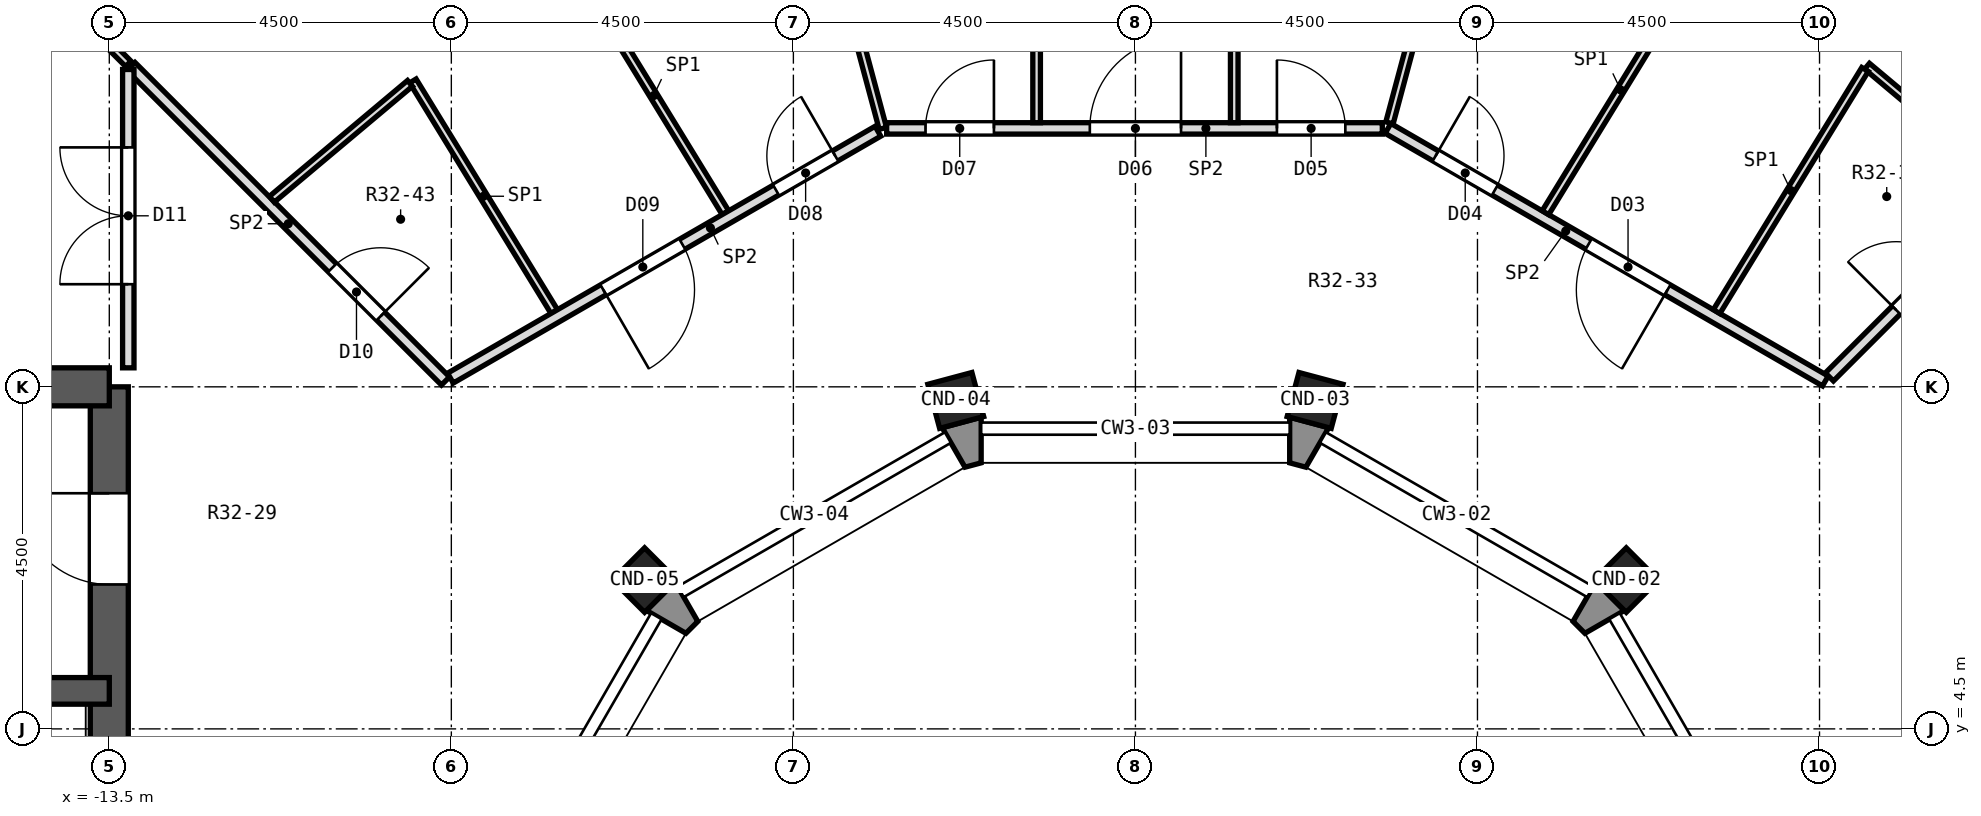
"""IFC4 building model, lengths in metres.
Left out: names, types, materials, properties, quantities, classifications, styles, units other than length and angle.
Written with IfcOpenShell. Run it as: python <this file> out.ifc"""

import sys

from ifc_helpers import new_model, si_unit, direction, frame, frame_2d, origin, origin_2d, place, context, subcontext, project, spatial, polyline, rectangle, outline, extrude, element, fill, save


model = new_model("IFC4")
c1 = context("Model", 3, precision=1e-05, world=origin(), true_north=direction((0.0, 1.0)))
c2 = subcontext(c1, "Body", "Model", "MODEL_VIEW")
j1 = project(units=[si_unit("LENGTHUNIT", "METRE"), si_unit("PLANEANGLEUNIT", "RADIAN")], contexts=[c1])
p1 = place(None, origin())
s1 = spatial("IfcSite", under=j1, at=p1, CompositionType="ELEMENT")
p2 = place(p1, origin())
s2 = spatial("IfcBuilding", under=s1, at=p2, CompositionType="ELEMENT")
p3 = place(p2, frame((0.0, 0.0, 224.7)))
s3 = spatial("IfcBuildingStorey", under=s2, at=p3, CompositionType="ELEMENT", Elevation=224.7)
for number, where, z_axis, x_axis in (
    (1, (6.458, 6.458, 0.0), (0.0, 0.0, 1.0), (0.707, 0.707, 0.0)),
    (2, (2.364, 8.821, 0.0), (0.0, 0.0, 1.0), (0.259, 0.966, 0.0)),
    (3, (-2.364, 8.821, 0.0), (0.0, 0.0, 1.0), (-0.259, 0.966, 0.0)),
    (4, (-6.458, 6.458, 0.0), (0.0, 0.0, 1.0), (-0.707, 0.707, 0.0)),
):
    element("IfcColumn", number, at=place(p3, frame(where, z_axis=z_axis, x_axis=x_axis)), inside=s3, PredefinedType="COLUMN", context=c2, shape_type="SweptSolid", body=[
        extrude(rectangle(XDim=0.6, YDim=0.6, at=origin_2d()), origin(), (0.0, 0.0, 1.0), 5.0),
    ])
p4 = place(p3, frame((-13.5, -9.0, 0.0), z_axis=(0.0, 0.0, 1.0), x_axis=(0.0, 1.0, 0.0)))
e5 = element("IfcWall", 5, at=p4, inside=s3, PredefinedType="SHEAR", context=c2, shape_type="SweptSolid", body=[
    extrude(rectangle(XDim=18.0, YDim=0.5, at=frame_2d((9.0, 0.0))), origin(), (0.0, 0.0, 1.0), 5.0),
])
p5 = place(p4, frame((15.4, 0.0, 0.0)))
e6 = element("IfcOpeningElement", 6, at=p5, cuts=e5, PredefinedType="OPENING", context=c2, shape_type="SweptSolid", body=[
    extrude(rectangle(XDim=1.2, YDim=2.1, at=frame_2d((0.6, 1.05))), frame((0.0, 0.262, 0.0), z_axis=(0.0, -1.0, 0.0), x_axis=(1.0, 0.0, 0.0)), (0.0, 0.0, 1.0), 0.524),
])
p6 = place(p4, frame((1.4, 0.0, 0.0)))
e7 = element("IfcOpeningElement", 7, at=p6, cuts=e5, PredefinedType="OPENING", context=c2, shape_type="SweptSolid", body=[
    extrude(rectangle(XDim=1.2, YDim=2.1, at=frame_2d((0.6, 1.05))), frame((0.0, 0.262, 0.0), z_axis=(0.0, -1.0, 0.0), x_axis=(1.0, 0.0, 0.0)), (0.0, 0.0, 1.0), 0.524),
])
p7 = place(p4, frame((7.5, 0.0, 0.0)))
e8 = element("IfcOpeningElement", 8, at=p7, cuts=e5, PredefinedType="OPENING", context=c2, shape_type="SweptSolid", body=[
    extrude(rectangle(XDim=3.0, YDim=2.4, at=frame_2d((1.5, 1.2))), frame((0.0, 0.262, 0.0), z_axis=(0.0, -1.0, 0.0), x_axis=(1.0, 0.0, 0.0)), (0.0, 0.0, 1.0), 0.524),
])
p8 = place(p3, frame((-13.5, 9.0, 0.0), z_axis=(0.0, 0.0, 1.0), x_axis=(-1.0, 0.0, 0.0)))
e9 = element("IfcWall", 9, at=p8, inside=s3, PredefinedType="SHEAR", context=c2, shape_type="SweptSolid", body=[
    extrude(rectangle(XDim=6.0, YDim=0.5, at=frame_2d((3.0, 0.0))), origin(), (0.0, 0.0, 1.0), 5.0),
])
p9 = place(p3, frame((-13.5, 5.0, 0.0), z_axis=(0.0, 0.0, 1.0), x_axis=(-1.0, 0.0, 0.0)))
e10 = element("IfcWall", 10, at=p9, inside=s3, PredefinedType="SHEAR", context=c2, shape_type="SweptSolid", body=[
    extrude(rectangle(XDim=6.0, YDim=0.35, at=frame_2d((3.0, 0.0))), origin(), (0.0, 0.0, 1.0), 5.0),
])
p10 = place(p3, origin())
e11 = element("IfcWall", 11, at=p10, inside=s3, PredefinedType="SOLIDWALL", context=c2, shape_type="SweptSolid", body=[
    extrude(outline(polyline([(6.058, 6.433), (5.758, 5.914), (5.914, 5.758), (6.433, 6.058), (6.058, 6.433)])), origin(), (0.0, 0.0, 1.0), 4.6),
])
p11 = place(p3, origin())
e12 = element("IfcWall", 12, at=p11, inside=s3, PredefinedType="SOLIDWALL", context=c2, shape_type="SweptSolid", body=[
    extrude(outline(polyline([(2.029, 8.6), (2.029, 8.0), (2.242, 7.943), (2.542, 8.462), (2.029, 8.6)])), origin(), (0.0, 0.0, 1.0), 4.6),
])
p12 = place(p3, origin())
e13 = element("IfcWall", 13, at=p12, inside=s3, PredefinedType="SOLIDWALL", context=c2, shape_type="SweptSolid", body=[
    extrude(outline(polyline([(-2.542, 8.462), (-2.242, 7.943), (-2.029, 8.0), (-2.029, 8.6), (-2.542, 8.462)])), origin(), (0.0, 0.0, 1.0), 4.6),
])
p13 = place(p3, origin())
e14 = element("IfcWall", 14, at=p13, inside=s3, PredefinedType="SOLIDWALL", context=c2, shape_type="SweptSolid", body=[
    extrude(outline(polyline([(-6.433, 6.058), (-5.914, 5.758), (-5.758, 5.914), (-6.058, 6.433), (-6.433, 6.058)])), origin(), (0.0, 0.0, 1.0), 4.6),
])
p14 = place(p3, frame((-5.646, 21.072, 0.0), z_axis=(0.0, 0.0, 1.0), x_axis=(0.258728835498, -0.965949993365, 0.0)))
e15 = element("IfcWall", 15, at=p14, inside=s3, PredefinedType="PARTITIONING", context=c2, shape_type="SweptSolid", body=[
    extrude(rectangle(XDim=8.978, YDim=0.1, at=frame_2d((4.489, 0.0))), origin(), (0.0, 0.0, 1.0), 4.6),
])
p15 = place(p3, frame((-9.506, 13.024, 0.0), z_axis=(0.0, 0.0, 1.0), x_axis=(0.522634449586, -0.852556879103, 0.0)))
e16 = element("IfcWall", 16, at=p15, inside=s3, PredefinedType="PARTITIONING", context=c2, shape_type="SweptSolid", body=[
    extrude(rectangle(XDim=3.559, YDim=0.1, at=frame_2d((1.779, 0.0))), origin(), (0.0, 0.0, 1.0), 4.6),
])
p16 = place(p3, frame((-7.282, 14.372, 0.0), z_axis=(0.0, 0.0, 1.0), x_axis=(0.522422625175, -0.852686695513, 0.0)))
e17 = element("IfcWall", 17, at=p16, inside=s3, PredefinedType="PARTITIONING", context=c2, shape_type="SweptSolid", body=[
    extrude(rectangle(XDim=3.613, YDim=0.1, at=frame_2d((1.807, 0.0))), origin(), (0.0, 0.0, 1.0), 4.6),
])
p17 = place(p3, frame((-15.426, 15.426, 0.0), z_axis=(0.0, 0.0, 1.0), x_axis=(0.707106781187, -0.707106781187, 0.0)))
e18 = element("IfcWall", 18, at=p17, inside=s3, PredefinedType="PARTITIONING", context=c2, shape_type="SweptSolid", body=[
    extrude(rectangle(XDim=3.077, YDim=0.1, at=frame_2d((1.538, 0.0))), origin(), (0.0, 0.0, 1.0), 4.6),
])
p18 = place(p3, frame((-13.215, 13.215, 0.0), z_axis=(0.0, 0.0, 1.0), x_axis=(0.707106781187, -0.707106781187, 0.0)))
e19 = element("IfcWall", 19, at=p18, inside=s3, PredefinedType="PARTITIONING", context=c2, shape_type="SweptSolid", body=[
    extrude(rectangle(XDim=5.852, YDim=0.15, at=frame_2d((2.926, 0.0))), origin(), (0.0, 0.0, 1.0), 4.6),
])
p19 = place(p18, frame((3.746, 0.0, 0.0)))
e20 = element("IfcOpeningElement", 20, at=p19, cuts=e19, PredefinedType="OPENING", context=c2, shape_type="SweptSolid", body=[
    extrude(rectangle(XDim=0.9, YDim=2.1, at=frame_2d((0.45, 1.05))), frame((0.0, 0.087, 0.0), z_axis=(0.0, -1.0, 0.0), x_axis=(1.0, 0.0, 0.0)), (0.0, 0.0, 1.0), 0.174),
])
p20 = place(p3, frame((9.625, 13.218, 0.0), z_axis=(0.0, 0.0, 1.0), x_axis=(0.766147679589, -0.642664557184, 0.0)))
e21 = element("IfcWall", 21, at=p20, inside=s3, PredefinedType="PARTITIONING", context=c2, shape_type="SweptSolid", body=[
    extrude(rectangle(XDim=2.475, YDim=0.1, at=frame_2d((1.238, 0.0))), origin(), (0.0, 0.0, 1.0), 4.6),
])
p21 = place(p3, frame((3.323, 12.4, 0.0), z_axis=(0.0, 0.0, 1.0), x_axis=(0.865961614908, -0.500110469302, 0.0)))
e22 = element("IfcWall", 22, at=p21, inside=s3, PredefinedType="PARTITIONING", context=c2, shape_type="SweptSolid", body=[
    extrude(rectangle(XDim=6.645, YDim=0.15, at=frame_2d((3.322, 0.0))), origin(), (0.0, 0.0, 1.0), 4.6),
])
p22 = place(p21, frame((3.047, 0.0, 0.0)))
e23 = element("IfcOpeningElement", 23, at=p22, cuts=e22, PredefinedType="OPENING", context=c2, shape_type="SweptSolid", body=[
    extrude(rectangle(XDim=1.2, YDim=2.1, at=frame_2d((0.6, 1.05))), frame((0.0, 0.087, 0.0), z_axis=(0.0, -1.0, 0.0), x_axis=(1.0, 0.0, 0.0)), (0.0, 0.0, 1.0), 0.174),
])
p23 = place(p21, frame((0.723, 0.0, 0.0)))
e24 = element("IfcOpeningElement", 24, at=p23, cuts=e22, PredefinedType="OPENING", context=c2, shape_type="SweptSolid", body=[
    extrude(rectangle(XDim=0.9, YDim=2.1, at=frame_2d((0.45, 1.05))), frame((0.0, 0.087, 0.0), z_axis=(0.0, -1.0, 0.0), x_axis=(1.0, 0.0, 0.0)), (0.0, 0.0, 1.0), 0.174),
])
p24 = place(p3, frame((-3.273, 12.4, 0.0), z_axis=(0.0, 0.0, 1.0), x_axis=(1.0, 0.0, 0.0)))
e25 = element("IfcWall", 25, at=p24, inside=s3, PredefinedType="PARTITIONING", context=c2, shape_type="SweptSolid", body=[
    extrude(rectangle(XDim=6.521, YDim=0.15, at=frame_2d((3.26, 0.0))), origin(), (0.0, 0.0, 1.0), 4.6),
])
p25 = place(p24, frame((5.135, 0.0, 0.0)))
e26 = element("IfcOpeningElement", 26, at=p25, cuts=e25, PredefinedType="OPENING", context=c2, shape_type="SweptSolid", body=[
    extrude(rectangle(XDim=0.9, YDim=2.1, at=frame_2d((0.45, 1.05))), frame((0.0, 0.087, 0.0), z_axis=(0.0, -1.0, 0.0), x_axis=(1.0, 0.0, 0.0)), (0.0, 0.0, 1.0), 0.174),
])
p26 = place(p24, frame((2.673, 0.0, 0.0)))
e27 = element("IfcOpeningElement", 27, at=p26, cuts=e25, PredefinedType="OPENING", context=c2, shape_type="SweptSolid", body=[
    extrude(rectangle(XDim=1.2, YDim=2.1, at=frame_2d((0.6, 1.05))), frame((0.0, 0.087, 0.0), z_axis=(0.0, -1.0, 0.0), x_axis=(1.0, 0.0, 0.0)), (0.0, 0.0, 1.0), 0.174),
])
p27 = place(p24, frame((0.511, 0.0, 0.0)))
e28 = element("IfcOpeningElement", 28, at=p27, cuts=e25, PredefinedType="OPENING", context=c2, shape_type="SweptSolid", body=[
    extrude(rectangle(XDim=0.9, YDim=2.1, at=frame_2d((0.45, 1.05))), frame((0.0, 0.087, 0.0), z_axis=(0.0, -1.0, 0.0), x_axis=(1.0, 0.0, 0.0)), (0.0, 0.0, 1.0), 0.174),
])
p28 = place(p3, frame((-9.012, 9.115, 0.0), z_axis=(0.0, 0.0, 1.0), x_axis=(0.865967095912, 0.5001009786, 0.0)))
e29 = element("IfcWall", 29, at=p28, inside=s3, PredefinedType="PARTITIONING", context=c2, shape_type="SweptSolid", body=[
    extrude(rectangle(XDim=6.495, YDim=0.15, at=frame_2d((3.248, 0.0))), origin(), (0.0, 0.0, 1.0), 4.6),
])
p29 = place(p28, frame((4.947, 0.0, 0.0)))
e30 = element("IfcOpeningElement", 30, at=p29, cuts=e29, PredefinedType="OPENING", context=c2, shape_type="SweptSolid", body=[
    extrude(rectangle(XDim=0.9, YDim=2.1, at=frame_2d((0.45, 1.05))), frame((0.0, 0.087, 0.0), z_axis=(0.0, -1.0, 0.0), x_axis=(1.0, 0.0, 0.0)), (0.0, 0.0, 1.0), 0.174),
])
p30 = place(p28, frame((2.323, 0.0, 0.0)))
e31 = element("IfcOpeningElement", 31, at=p30, cuts=e29, PredefinedType="OPENING", context=c2, shape_type="SweptSolid", body=[
    extrude(rectangle(XDim=1.2, YDim=2.1, at=frame_2d((0.6, 1.05))), frame((0.0, 0.087, 0.0), z_axis=(0.0, -1.0, 0.0), x_axis=(1.0, 0.0, 0.0)), (0.0, 0.0, 1.0), 0.174),
])
p31 = place(p3, frame((-11.362, 11.467, 0.0), z_axis=(0.0, 0.0, 1.0), x_axis=(0.766108172673, 0.642711652115, 0.0)))
e32 = element("IfcWall", 32, at=p31, inside=s3, PredefinedType="PARTITIONING", context=c2, shape_type="SweptSolid", body=[
    extrude(rectangle(XDim=2.372, YDim=0.1, at=frame_2d((1.186, 0.0))), origin(), (0.0, 0.0, 1.0), 4.6),
])
p32 = place(p3, frame((9.13, 9.13, 0.0), z_axis=(0.0, 0.0, 1.0), x_axis=(0.707106781187, 0.707106781187, 0.0)))
e33 = element("IfcWall", 33, at=p32, inside=s3, PredefinedType="PARTITIONING", context=c2, shape_type="SweptSolid", body=[
    extrude(rectangle(XDim=5.777, YDim=0.15, at=frame_2d((2.888, 0.0))), origin(), (0.0, 0.0, 1.0), 4.6),
])
p33 = place(p32, frame((1.244, 0.0, 0.0)))
e34 = element("IfcOpeningElement", 34, at=p33, cuts=e33, PredefinedType="OPENING", context=c2, shape_type="SweptSolid", body=[
    extrude(rectangle(XDim=0.9, YDim=2.1, at=frame_2d((0.45, 1.05))), frame((0.0, 0.087, 0.0), z_axis=(0.0, -1.0, 0.0), x_axis=(1.0, 0.0, 0.0)), (0.0, 0.0, 1.0), 0.174),
])
p34 = place(p3, frame((7.646, 9.99, 0.0), z_axis=(0.0, 0.0, 1.0), x_axis=(0.522631009754, 0.852558987779, 0.0)))
e35 = element("IfcWall", 35, at=p34, inside=s3, PredefinedType="PARTITIONING", context=c2, shape_type="SweptSolid", body=[
    extrude(rectangle(XDim=3.736, YDim=0.1, at=frame_2d((1.868, 0.0))), origin(), (0.0, 0.0, 1.0), 4.6),
])
p35 = place(p3, frame((5.394, 11.291, 0.0), z_axis=(0.0, 0.0, 1.0), x_axis=(0.522471391937, 0.852656815259, 0.0)))
e36 = element("IfcWall", 36, at=p35, inside=s3, PredefinedType="PARTITIONING", context=c2, shape_type="SweptSolid", body=[
    extrude(rectangle(XDim=3.789, YDim=0.1, at=frame_2d((1.895, 0.0))), origin(), (0.0, 0.0, 1.0), 4.6),
])
p36 = place(p3, frame((3.342, 12.472, 0.0), z_axis=(0.0, 0.0, 1.0), x_axis=(0.258684909749, 0.965961757767, 0.0)))
e37 = element("IfcWall", 37, at=p36, inside=s3, PredefinedType="PARTITIONING", context=c2, shape_type="SweptSolid", body=[
    extrude(rectangle(XDim=8.903, YDim=0.1, at=frame_2d((4.451, 0.0))), origin(), (0.0, 0.0, 1.0), 4.6),
])
for number, where, z_axis, x_axis in (
    (38, (1.3, 12.475, 0.0), (0.0, 0.0, 1.0), (0.0, 1.0, 0.0)),
    (39, (-1.3, 12.475, 0.0), (0.0, 0.0, 1.0), (0.0, 1.0, 0.0)),
):
    element("IfcWall", number, at=place(p3, frame(where, z_axis=z_axis, x_axis=x_axis)), inside=s3, PredefinedType="PARTITIONING", context=c2, shape_type="SweptSolid", body=[
        extrude(rectangle(XDim=4.287, YDim=0.1, at=frame_2d((2.144, 0.0))), origin(), (0.0, 0.0, 1.0), 4.6),
    ])
p37 = place(p3, frame((-13.25, 9.25, 0.0), z_axis=(0.0, 0.0, 1.0), x_axis=(0.0, 1.0, 0.0)))
e40 = element("IfcWall", 40, at=p37, inside=s3, PredefinedType="PARTITIONING", context=c2, shape_type="SweptSolid", body=[
    extrude(rectangle(XDim=3.925, YDim=0.15, at=frame_2d((1.962, 0.0))), origin(), (0.0, 0.0, 1.0), 4.6),
])
p38 = place(p37, frame((1.1, 0.0, 0.0)))
e41 = element("IfcOpeningElement", 41, at=p38, cuts=e40, PredefinedType="OPENING", context=c2, shape_type="SweptSolid", body=[
    extrude(rectangle(XDim=1.8, YDim=2.1, at=frame_2d((0.9, 1.05))), frame((0.0, 0.087, 0.0), z_axis=(0.0, -1.0, 0.0), x_axis=(1.0, 0.0, 0.0)), (0.0, 0.0, 1.0), 0.174),
])
p39 = place(p33, origin())
e42 = element("IfcDoor", 42, at=p39, inside=s3, OperationType="SINGLE_SWING_LEFT", PredefinedType="DOOR", context=c2, shape_type="SweptSolid", body=[
    extrude(rectangle(XDim=0.9, YDim=2.1, at=frame_2d((0.45, 1.05))), frame((0.0, 0.025, 0.0), z_axis=(0.0, -1.0, 0.0), x_axis=(1.0, 0.0, 0.0)), (0.0, 0.0, 1.0), 0.05),
])
fill(e34, e42)
p40 = place(p22, frame((1.2, 0.0, 0.0), z_axis=(0.0, 0.0, 1.0), x_axis=(-1.0, 0.0, 0.0)))
e43 = element("IfcDoor", 43, at=p40, inside=s3, OperationType="SINGLE_SWING_LEFT", PredefinedType="DOOR", context=c2, shape_type="SweptSolid", body=[
    extrude(rectangle(XDim=1.2, YDim=2.1, at=frame_2d((0.6, 1.05))), frame((0.0, 0.025, 0.0), z_axis=(0.0, -1.0, 0.0), x_axis=(1.0, 0.0, 0.0)), (0.0, 0.0, 1.0), 0.05),
])
fill(e23, e43)
p41 = place(p23, origin())
e44 = element("IfcDoor", 44, at=p41, inside=s3, OperationType="SINGLE_SWING_LEFT", PredefinedType="DOOR", context=c2, shape_type="SweptSolid", body=[
    extrude(rectangle(XDim=0.9, YDim=2.1, at=frame_2d((0.45, 1.05))), frame((0.0, 0.025, 0.0), z_axis=(0.0, -1.0, 0.0), x_axis=(1.0, 0.0, 0.0)), (0.0, 0.0, 1.0), 0.05),
])
fill(e24, e44)
p42 = place(p25, origin())
e45 = element("IfcDoor", 45, at=p42, inside=s3, OperationType="SINGLE_SWING_LEFT", PredefinedType="DOOR", context=c2, shape_type="SweptSolid", body=[
    extrude(rectangle(XDim=0.9, YDim=2.1, at=frame_2d((0.45, 1.05))), frame((0.0, 0.025, 0.0), z_axis=(0.0, -1.0, 0.0), x_axis=(1.0, 0.0, 0.0)), (0.0, 0.0, 1.0), 0.05),
])
fill(e26, e45)
p43 = place(p26, origin())
e46 = element("IfcDoor", 46, at=p43, inside=s3, OperationType="SINGLE_SWING_RIGHT", PredefinedType="DOOR", context=c2, shape_type="SweptSolid", body=[
    extrude(rectangle(XDim=1.2, YDim=2.1, at=frame_2d((0.6, 1.05))), frame((0.0, 0.025, 0.0), z_axis=(0.0, -1.0, 0.0), x_axis=(1.0, 0.0, 0.0)), (0.0, 0.0, 1.0), 0.05),
])
fill(e27, e46)
p44 = place(p27, origin())
e47 = element("IfcDoor", 47, at=p44, inside=s3, OperationType="SINGLE_SWING_RIGHT", PredefinedType="DOOR", context=c2, shape_type="SweptSolid", body=[
    extrude(rectangle(XDim=0.9, YDim=2.1, at=frame_2d((0.45, 1.05))), frame((0.0, 0.025, 0.0), z_axis=(0.0, -1.0, 0.0), x_axis=(1.0, 0.0, 0.0)), (0.0, 0.0, 1.0), 0.05),
])
fill(e28, e47)
p45 = place(p29, origin())
e48 = element("IfcDoor", 48, at=p45, inside=s3, OperationType="SINGLE_SWING_RIGHT", PredefinedType="DOOR", context=c2, shape_type="SweptSolid", body=[
    extrude(rectangle(XDim=0.9, YDim=2.1, at=frame_2d((0.45, 1.05))), frame((0.0, 0.025, 0.0), z_axis=(0.0, -1.0, 0.0), x_axis=(1.0, 0.0, 0.0)), (0.0, 0.0, 1.0), 0.05),
])
fill(e30, e48)
p46 = place(p30, frame((1.2, 0.0, 0.0), z_axis=(0.0, 0.0, 1.0), x_axis=(-1.0, 0.0, 0.0)))
e49 = element("IfcDoor", 49, at=p46, inside=s3, OperationType="SINGLE_SWING_RIGHT", PredefinedType="DOOR", context=c2, shape_type="SweptSolid", body=[
    extrude(rectangle(XDim=1.2, YDim=2.1, at=frame_2d((0.6, 1.05))), frame((0.0, 0.025, 0.0), z_axis=(0.0, -1.0, 0.0), x_axis=(1.0, 0.0, 0.0)), (0.0, 0.0, 1.0), 0.05),
])
fill(e31, e49)
p47 = place(p19, origin())
e50 = element("IfcDoor", 50, at=p47, inside=s3, OperationType="SINGLE_SWING_RIGHT", PredefinedType="DOOR", context=c2, shape_type="SweptSolid", body=[
    extrude(rectangle(XDim=0.9, YDim=2.1, at=frame_2d((0.45, 1.05))), frame((0.0, 0.025, 0.0), z_axis=(0.0, -1.0, 0.0), x_axis=(1.0, 0.0, 0.0)), (0.0, 0.0, 1.0), 0.05),
])
fill(e20, e50)
p48 = place(p38, origin())
e51 = element("IfcDoor", 51, at=p48, inside=s3, OperationType="DOUBLE_DOOR_SINGLE_SWING", PredefinedType="DOOR", context=c2, shape_type="SweptSolid", body=[
    extrude(rectangle(XDim=1.8, YDim=2.1, at=frame_2d((0.9, 1.05))), frame((0.0, 0.025, 0.0), z_axis=(0.0, -1.0, 0.0), x_axis=(1.0, 0.0, 0.0)), (0.0, 0.0, 1.0), 0.05),
])
fill(e41, e51)
p49 = place(p5, origin())
e52 = element("IfcDoor", 52, at=p49, inside=s3, OperationType="SINGLE_SWING_RIGHT", PredefinedType="DOOR", context=c2, shape_type="SweptSolid", body=[
    extrude(rectangle(XDim=1.2, YDim=2.1, at=frame_2d((0.6, 1.05))), frame((0.0, 0.025, 0.0), z_axis=(0.0, -1.0, 0.0), x_axis=(1.0, 0.0, 0.0)), (0.0, 0.0, 1.0), 0.05),
])
fill(e6, e52)
save(model, sys.argv[1])
